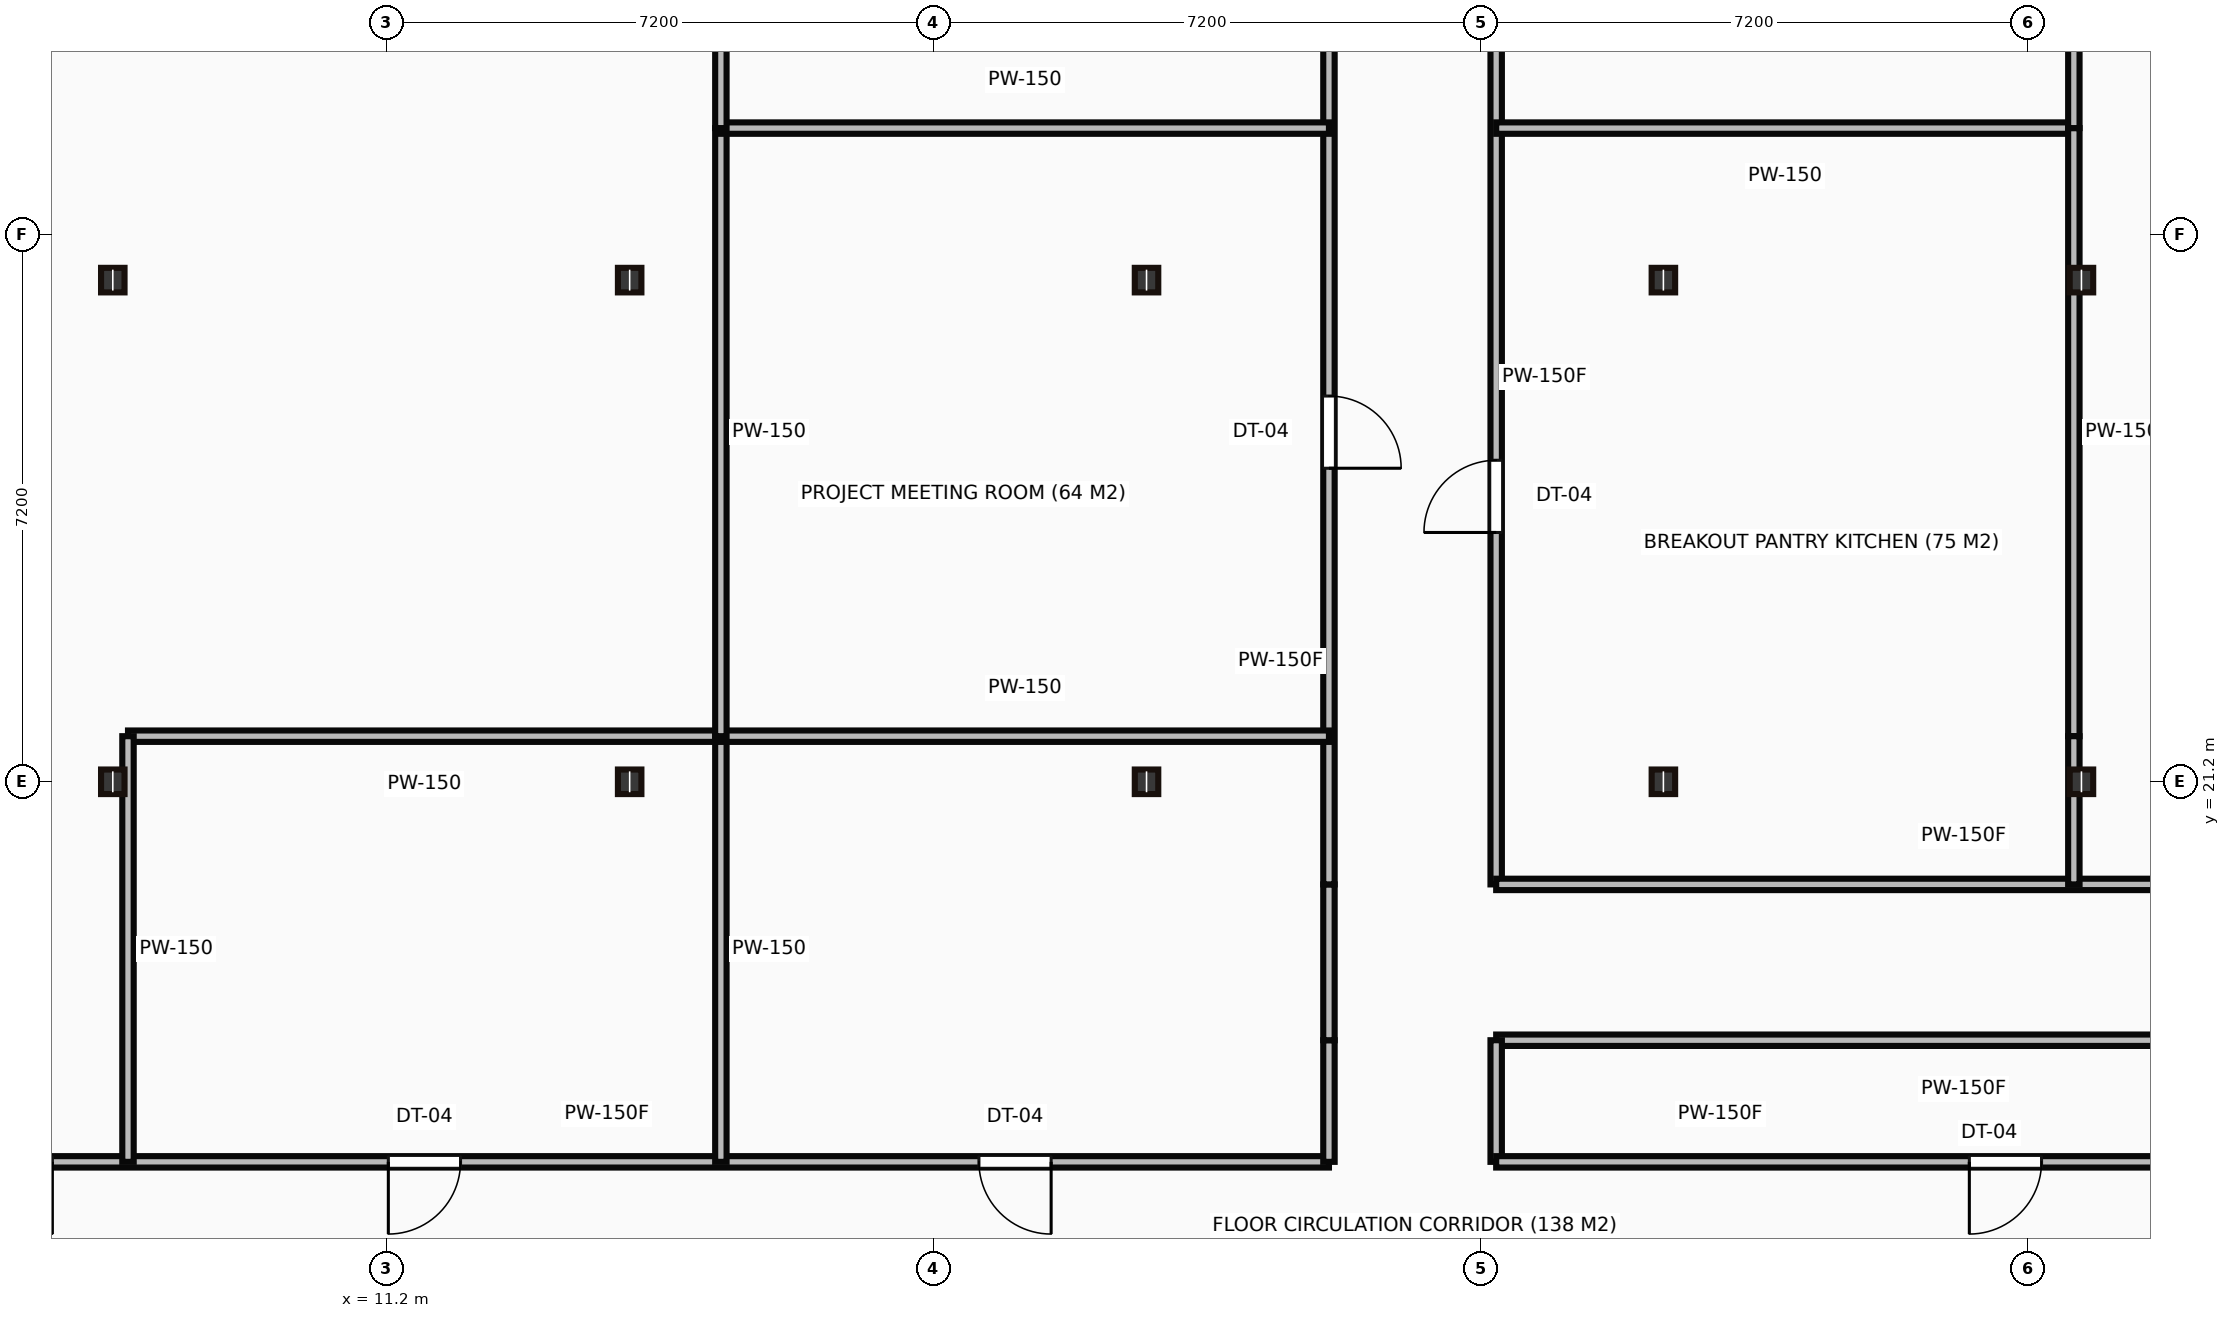
"""IFC4 building model, lengths in metres.
Left out: names, types, materials, properties, quantities, classifications, styles, units other than length and angle.
Written with IfcOpenShell. Run it as: python <this file> out.ifc"""

import sys

from ifc_helpers import new_model, si_unit, direction, frame, frame_2d, origin, origin_2d, place, context, subcontext, project, spatial, rectangle, i_section, extrude, source, transform, mapped, element, fill, save


model = new_model("IFC4")
c1 = context("Model", 3, precision=1e-05, world=origin(), true_north=direction((0.0, 1.0)))
c2 = subcontext(c1, "Body", "Model", "MODEL_VIEW")
j1 = project(units=[si_unit("LENGTHUNIT", "METRE"), si_unit("PLANEANGLEUNIT", "RADIAN")], contexts=[c1])
p1 = place(None, origin())
s1 = spatial("IfcSite", under=j1, at=p1, CompositionType="ELEMENT")
p2 = place(p1, origin())
s2 = spatial("IfcBuilding", under=s1, at=p2, CompositionType="ELEMENT")
p3 = place(p2, frame((0.0, 0.0, 217.8)))
s3 = spatial("IfcBuildingStorey", under=s2, at=p3, CompositionType="ELEMENT", Elevation=217.8)
m1 = source(origin(), c2, "Body", "SweptSolid", [
    extrude(i_section(OverallWidth=0.309, OverallDepth=0.323, WebThickness=0.014, FlangeThickness=0.023, at=origin_2d()), origin(), (0.0, 0.0, 1.0), 3.65),
])
for number, where, z_axis, x_axis in (
    (1, (7.6, 21.2, 0.0), (0.0, 0.0, 1.0), (1.0, 0.0, 0.0)),
    (2, (7.6, 27.8, 0.0), (0.0, 0.0, 1.0), (1.0, 0.0, 0.0)),
    (3, (14.4, 21.2, 0.0), (0.0, 0.0, 1.0), (1.0, 0.0, 0.0)),
    (4, (14.4, 27.8, 0.0), (0.0, 0.0, 1.0), (1.0, 0.0, 0.0)),
    (5, (21.2, 21.2, 0.0), (0.0, 0.0, 1.0), (1.0, 0.0, 0.0)),
    (6, (21.2, 27.8, 0.0), (0.0, 0.0, 1.0), (1.0, 0.0, 0.0)),
    (7, (28.0, 21.2, 0.0), (0.0, 0.0, 1.0), (1.0, 0.0, 0.0)),
    (8, (28.0, 27.8, 0.0), (0.0, 0.0, 1.0), (1.0, 0.0, 0.0)),
    (9, (33.5, 21.2, 0.0), (0.0, 0.0, 1.0), (1.0, 0.0, 0.0)),
    (10, (33.5, 27.8, 0.0), (0.0, 0.0, 1.0), (1.0, 0.0, 0.0)),
):
    element("IfcColumn", number, at=place(p3, frame(where, z_axis=z_axis, x_axis=x_axis)), inside=s3, PredefinedType="COLUMN", context=c2, shape_type="MappedRepresentation", body=[
        mapped(m1, transform((0.0, 0.0, 0.0))),
    ])
m2 = source(origin(), c2, "Body", "SweptSolid", [
    extrude(rectangle(XDim=19.0, YDim=0.15, at=frame_2d((9.5, 0.0))), origin(), (0.0, 0.0, 1.0), 3.4),
])
p4 = place(p3, frame((4.6, 16.2, 0.0), z_axis=(0.0, 0.0, 1.0), x_axis=(1.0, 0.0, 0.0)))
e11 = element("IfcWall", 11, at=p4, inside=s3, PredefinedType="PARTITIONING", context=c2, shape_type="MappedRepresentation", body=[
    mapped(m2, transform((0.0, 0.0, 0.0))),
])
p5 = place(p4, frame((1.255, 0.0, 0.0)))
e12 = element("IfcOpeningElement", 12, at=p5, cuts=e11, PredefinedType="OPENING", context=c2, shape_type="SweptSolid", body=[
    extrude(rectangle(XDim=0.95, YDim=2.15, at=frame_2d((0.475, 1.075))), frame((0.0, 0.085, 0.0), z_axis=(0.0, -1.0, 0.0), x_axis=(1.0, 0.0, 0.0)), (0.0, 0.0, 1.0), 0.17),
])
p6 = place(p4, frame((6.625, 0.0, 0.0)))
e13 = element("IfcOpeningElement", 13, at=p6, cuts=e11, PredefinedType="OPENING", context=c2, shape_type="SweptSolid", body=[
    extrude(rectangle(XDim=0.95, YDim=2.15, at=frame_2d((0.475, 1.075))), frame((0.0, 0.085, 0.0), z_axis=(0.0, -1.0, 0.0), x_axis=(1.0, 0.0, 0.0)), (0.0, 0.0, 1.0), 0.17),
])
p7 = place(p4, frame((14.395, 0.0, 0.0)))
e14 = element("IfcOpeningElement", 14, at=p7, cuts=e11, PredefinedType="OPENING", context=c2, shape_type="SweptSolid", body=[
    extrude(rectangle(XDim=0.95, YDim=2.15, at=frame_2d((0.475, 1.075))), frame((0.0, 0.085, 0.0), z_axis=(0.0, -1.0, 0.0), x_axis=(1.0, 0.0, 0.0)), (0.0, 0.0, 1.0), 0.17),
])
m3 = source(origin(), c2, "Body", "SweptSolid", [
    extrude(rectangle(XDim=1.6, YDim=0.15, at=frame_2d((0.8, 0.0))), origin(), (0.0, 0.0, 1.0), 3.4),
])
p8 = place(p3, frame((23.6, 16.2, 0.0), z_axis=(0.0, 0.0, 1.0), x_axis=(0.0, 1.0, 0.0)))
e15 = element("IfcWall", 15, at=p8, inside=s3, PredefinedType="PARTITIONING", context=c2, shape_type="MappedRepresentation", body=[
    mapped(m3, transform((0.0, 0.0, 0.0))),
])
m4 = source(origin(), c2, "Body", "SweptSolid", [
    extrude(rectangle(XDim=2.05, YDim=0.15, at=frame_2d((1.025, 0.0))), origin(), (0.0, 0.0, 1.0), 3.4),
])
p9 = place(p3, frame((23.6, 17.8, 0.0), z_axis=(0.0, 0.0, 1.0), x_axis=(0.0, 1.0, 0.0)))
e16 = element("IfcWall", 16, at=p9, inside=s3, PredefinedType="PARTITIONING", context=c2, shape_type="MappedRepresentation", body=[
    mapped(m4, transform((0.0, 0.0, 0.0))),
])
m5 = source(origin(), c2, "Body", "SweptSolid", [
    extrude(rectangle(XDim=13.35, YDim=0.15, at=frame_2d((6.675, 0.0))), origin(), (0.0, 0.0, 1.0), 3.4),
])
p10 = place(p3, frame((23.6, 19.85, 0.0), z_axis=(0.0, 0.0, 1.0), x_axis=(0.0, 1.0, 0.0)))
e17 = element("IfcWall", 17, at=p10, inside=s3, PredefinedType="PARTITIONING", context=c2, shape_type="MappedRepresentation", body=[
    mapped(m5, transform((0.0, 0.0, 0.0))),
])
p11 = place(p10, frame((5.475, 0.0, 0.0)))
e18 = element("IfcOpeningElement", 18, at=p11, cuts=e17, PredefinedType="OPENING", context=c2, shape_type="SweptSolid", body=[
    extrude(rectangle(XDim=0.95, YDim=2.15, at=frame_2d((0.475, 1.075))), frame((0.0, 0.085, 0.0), z_axis=(0.0, -1.0, 0.0), x_axis=(1.0, 0.0, 0.0)), (0.0, 0.0, 1.0), 0.17),
])
p12 = place(p10, frame((11.045, 0.0, 0.0)))
e19 = element("IfcOpeningElement", 19, at=p12, cuts=e17, PredefinedType="OPENING", context=c2, shape_type="SweptSolid", body=[
    extrude(rectangle(XDim=0.95, YDim=2.15, at=frame_2d((0.475, 1.075))), frame((0.0, 0.085, 0.0), z_axis=(0.0, -1.0, 0.0), x_axis=(1.0, 0.0, 0.0)), (0.0, 0.0, 1.0), 0.17),
])
p13 = place(p3, frame((25.8, 33.2, 0.0), z_axis=(0.0, 0.0, 1.0), x_axis=(0.0, -1.0, 0.0)))
e20 = element("IfcWall", 20, at=p13, inside=s3, PredefinedType="PARTITIONING", context=c2, shape_type="MappedRepresentation", body=[
    mapped(m5, transform((0.0, 0.0, 0.0))),
])
p14 = place(p13, frame((1.355, 0.0, 0.0)))
e21 = element("IfcOpeningElement", 21, at=p14, cuts=e20, PredefinedType="OPENING", context=c2, shape_type="SweptSolid", body=[
    extrude(rectangle(XDim=0.95, YDim=2.15, at=frame_2d((0.475, 1.075))), frame((0.0, 0.085, 0.0), z_axis=(0.0, -1.0, 0.0), x_axis=(1.0, 0.0, 0.0)), (0.0, 0.0, 1.0), 0.17),
])
p15 = place(p13, frame((7.77, 0.0, 0.0)))
e22 = element("IfcOpeningElement", 22, at=p15, cuts=e20, PredefinedType="OPENING", context=c2, shape_type="SweptSolid", body=[
    extrude(rectangle(XDim=0.95, YDim=2.15, at=frame_2d((0.475, 1.075))), frame((0.0, 0.085, 0.0), z_axis=(0.0, -1.0, 0.0), x_axis=(1.0, 0.0, 0.0)), (0.0, 0.0, 1.0), 0.17),
])
m6 = source(origin(), c2, "Body", "SweptSolid", [
    extrude(rectangle(XDim=12.3, YDim=0.15, at=frame_2d((6.15, 0.0))), origin(), (0.0, 0.0, 1.0), 3.4),
])
for number, where, z_axis, x_axis in (
    (23, (25.8, 19.85, 0.0), (0.0, 0.0, 1.0), (1.0, 0.0, 0.0)),
    (24, (38.1, 17.8, 0.0), (0.0, 0.0, 1.0), (-1.0, 0.0, 0.0)),
):
    element("IfcWall", number, at=place(p3, frame(where, z_axis=z_axis, x_axis=x_axis)), inside=s3, PredefinedType="PARTITIONING", context=c2, shape_type="MappedRepresentation", body=[
        mapped(m6, transform((0.0, 0.0, 0.0))),
    ])
p16 = place(p3, frame((25.8, 17.8, 0.0), z_axis=(0.0, 0.0, 1.0), x_axis=(0.0, -1.0, 0.0)))
e25 = element("IfcWall", 25, at=p16, inside=s3, PredefinedType="PARTITIONING", context=c2, shape_type="MappedRepresentation", body=[
    mapped(m3, transform((0.0, 0.0, 0.0))),
])
m7 = source(origin(), c2, "Body", "SweptSolid", [
    extrude(rectangle(XDim=13.4, YDim=0.15, at=frame_2d((6.7, 0.0))), origin(), (0.0, 0.0, 1.0), 3.4),
])
p17 = place(p3, frame((25.8, 16.2, 0.0), z_axis=(0.0, 0.0, 1.0), x_axis=(1.0, 0.0, 0.0)))
e26 = element("IfcWall", 26, at=p17, inside=s3, PredefinedType="PARTITIONING", context=c2, shape_type="MappedRepresentation", body=[
    mapped(m7, transform((0.0, 0.0, 0.0))),
])
p18 = place(p17, frame((6.225, 0.0, 0.0)))
e27 = element("IfcOpeningElement", 27, at=p18, cuts=e26, PredefinedType="OPENING", context=c2, shape_type="SweptSolid", body=[
    extrude(rectangle(XDim=0.95, YDim=2.15, at=frame_2d((0.475, 1.075))), frame((0.0, 0.085, 0.0), z_axis=(0.0, -1.0, 0.0), x_axis=(1.0, 0.0, 0.0)), (0.0, 0.0, 1.0), 0.17),
])
m8 = source(origin(), c2, "Body", "SweptSolid", [
    extrude(rectangle(XDim=7.8, YDim=0.15, at=frame_2d((3.9, 0.0))), origin(), (0.0, 0.0, 1.0), 3.4),
])
p19 = place(p3, frame((15.6, 21.8, 0.0), z_axis=(0.0, 0.0, 1.0), x_axis=(-1.0, 0.0, 0.0)))
e28 = element("IfcWall", 28, at=p19, inside=s3, PredefinedType="PARTITIONING", context=c2, shape_type="MappedRepresentation", body=[
    mapped(m8, transform((0.0, 0.0, 0.0))),
])
m9 = source(origin(), c2, "Body", "SweptSolid", [
    extrude(rectangle(XDim=5.6, YDim=0.15, at=frame_2d((2.8, 0.0))), origin(), (0.0, 0.0, 1.0), 3.4),
])
for number, where, z_axis, x_axis in (
    (29, (7.8, 21.8, 0.0), (0.0, 0.0, 1.0), (0.0, -1.0, 0.0)),
    (30, (15.6, 21.8, 0.0), (0.0, 0.0, 1.0), (0.0, -1.0, 0.0)),
):
    element("IfcWall", number, at=place(p3, frame(where, z_axis=z_axis, x_axis=x_axis)), inside=s3, PredefinedType="PARTITIONING", context=c2, shape_type="MappedRepresentation", body=[
        mapped(m9, transform((0.0, 0.0, 0.0))),
    ])
m10 = source(origin(), c2, "Body", "SweptSolid", [
    extrude(rectangle(XDim=8.0, YDim=0.15, at=frame_2d((4.0, 0.0))), origin(), (0.0, 0.0, 1.0), 3.4),
])
for number, where, z_axis, x_axis in (
    (31, (15.6, 21.8, 0.0), (0.0, 0.0, 1.0), (1.0, 0.0, 0.0)),
    (32, (15.6, 29.8, 0.0), (0.0, 0.0, 1.0), (0.0, -1.0, 0.0)),
    (33, (15.6, 29.8, 0.0), (0.0, 0.0, 1.0), (1.0, 0.0, 0.0)),
):
    element("IfcWall", number, at=place(p3, frame(where, z_axis=z_axis, x_axis=x_axis)), inside=s3, PredefinedType="PARTITIONING", context=c2, shape_type="MappedRepresentation", body=[
        mapped(m10, transform((0.0, 0.0, 0.0))),
    ])
m11 = source(origin(), c2, "Body", "SweptSolid", [
    extrude(rectangle(XDim=9.191, YDim=0.15, at=frame_2d((4.596, 0.0))), origin(), (0.0, 0.0, 1.0), 3.4),
])
p20 = place(p3, frame((15.6, 38.991, 0.0), z_axis=(0.0, 0.0, 1.0), x_axis=(0.0, -1.0, 0.0)))
e34 = element("IfcWall", 34, at=p20, inside=s3, PredefinedType="PARTITIONING", context=c2, shape_type="MappedRepresentation", body=[
    mapped(m11, transform((0.0, 0.0, 0.0))),
])
m12 = source(origin(), c2, "Body", "SweptSolid", [
    extrude(rectangle(XDim=7.6, YDim=0.15, at=frame_2d((3.8, 0.0))), origin(), (0.0, 0.0, 1.0), 3.4),
])
p21 = place(p3, frame((33.4, 29.8, 0.0), z_axis=(0.0, 0.0, 1.0), x_axis=(-1.0, 0.0, 0.0)))
e35 = element("IfcWall", 35, at=p21, inside=s3, PredefinedType="PARTITIONING", context=c2, shape_type="MappedRepresentation", body=[
    mapped(m12, transform((0.0, 0.0, 0.0))),
])
m13 = source(origin(), c2, "Body", "SweptSolid", [
    extrude(rectangle(XDim=8.0, YDim=0.15, at=frame_2d((4.0, 0.0))), origin(), (0.0, 0.0, 1.0), 2.787),
])
p22 = place(p3, frame((33.4, 29.8, 0.0), z_axis=(0.0, 0.0, 1.0), x_axis=(0.0, -1.0, 0.0)))
e36 = element("IfcWall", 36, at=p22, inside=s3, PredefinedType="PARTITIONING", context=c2, shape_type="MappedRepresentation", body=[
    mapped(m13, transform((0.0, 0.0, 0.0))),
])
m14 = source(origin(), c2, "Body", "SweptSolid", [
    extrude(rectangle(XDim=1.95, YDim=0.15, at=frame_2d((0.975, 0.0))), origin(), (0.0, 0.0, 1.0), 2.787),
])
p23 = place(p3, frame((33.4, 21.8, 0.0), z_axis=(0.0, 0.0, 1.0), x_axis=(0.0, -1.0, 0.0)))
e37 = element("IfcWall", 37, at=p23, inside=s3, PredefinedType="PARTITIONING", context=c2, shape_type="MappedRepresentation", body=[
    mapped(m14, transform((0.0, 0.0, 0.0))),
])
m15 = source(origin(), c2, "Body", "SweptSolid", [
    extrude(rectangle(XDim=6.226, YDim=0.15, at=frame_2d((3.113, 0.0))), origin(), (0.0, 0.0, 1.0), 2.787),
])
p24 = place(p3, frame((33.4, 36.026, 0.0), z_axis=(0.0, 0.0, 1.0), x_axis=(0.0, -1.0, 0.0)))
e38 = element("IfcWall", 38, at=p24, inside=s3, PredefinedType="PARTITIONING", context=c2, shape_type="MappedRepresentation", body=[
    mapped(m15, transform((0.0, 0.0, 0.0))),
])
m16 = source(origin(), c2, "Body", "SweptSolid", [
    extrude(rectangle(XDim=0.95, YDim=2.15, at=frame_2d((0.475, 1.075))), frame((0.0, 0.025, 0.0), z_axis=(0.0, -1.0, 0.0), x_axis=(1.0, 0.0, 0.0)), (0.0, 0.0, 1.0), 0.05),
])
p25 = place(p5, origin())
e39 = element("IfcDoor", 39, at=p25, inside=s3, OperationType="SINGLE_SWING_RIGHT", PredefinedType="DOOR", context=c2, shape_type="MappedRepresentation", body=[
    mapped(m16, transform((0.0, 0.0, 0.0))),
])
fill(e12, e39)
p26 = place(p6, origin())
e40 = element("IfcDoor", 40, at=p26, inside=s3, OperationType="SINGLE_SWING_LEFT", PredefinedType="DOOR", context=c2, shape_type="MappedRepresentation", body=[
    mapped(m16, transform((0.0, 0.0, 0.0))),
])
fill(e13, e40)
p27 = place(p7, origin())
e41 = element("IfcDoor", 41, at=p27, inside=s3, OperationType="SINGLE_SWING_RIGHT", PredefinedType="DOOR", context=c2, shape_type="MappedRepresentation", body=[
    mapped(m16, transform((0.0, 0.0, 0.0))),
])
fill(e14, e41)
p28 = place(p11, origin())
e42 = element("IfcDoor", 42, at=p28, inside=s3, OperationType="SINGLE_SWING_LEFT", PredefinedType="DOOR", context=c2, shape_type="MappedRepresentation", body=[
    mapped(m16, transform((0.0, 0.0, 0.0))),
])
fill(e18, e42)
p29 = place(p15, origin())
e43 = element("IfcDoor", 43, at=p29, inside=s3, OperationType="SINGLE_SWING_RIGHT", PredefinedType="DOOR", context=c2, shape_type="MappedRepresentation", body=[
    mapped(m16, transform((0.0, 0.0, 0.0))),
])
fill(e22, e43)
p30 = place(p18, origin())
e44 = element("IfcDoor", 44, at=p30, inside=s3, OperationType="SINGLE_SWING_LEFT", PredefinedType="DOOR", context=c2, shape_type="MappedRepresentation", body=[
    mapped(m16, transform((0.0, 0.0, 0.0))),
])
fill(e27, e44)
save(model, sys.argv[1])
